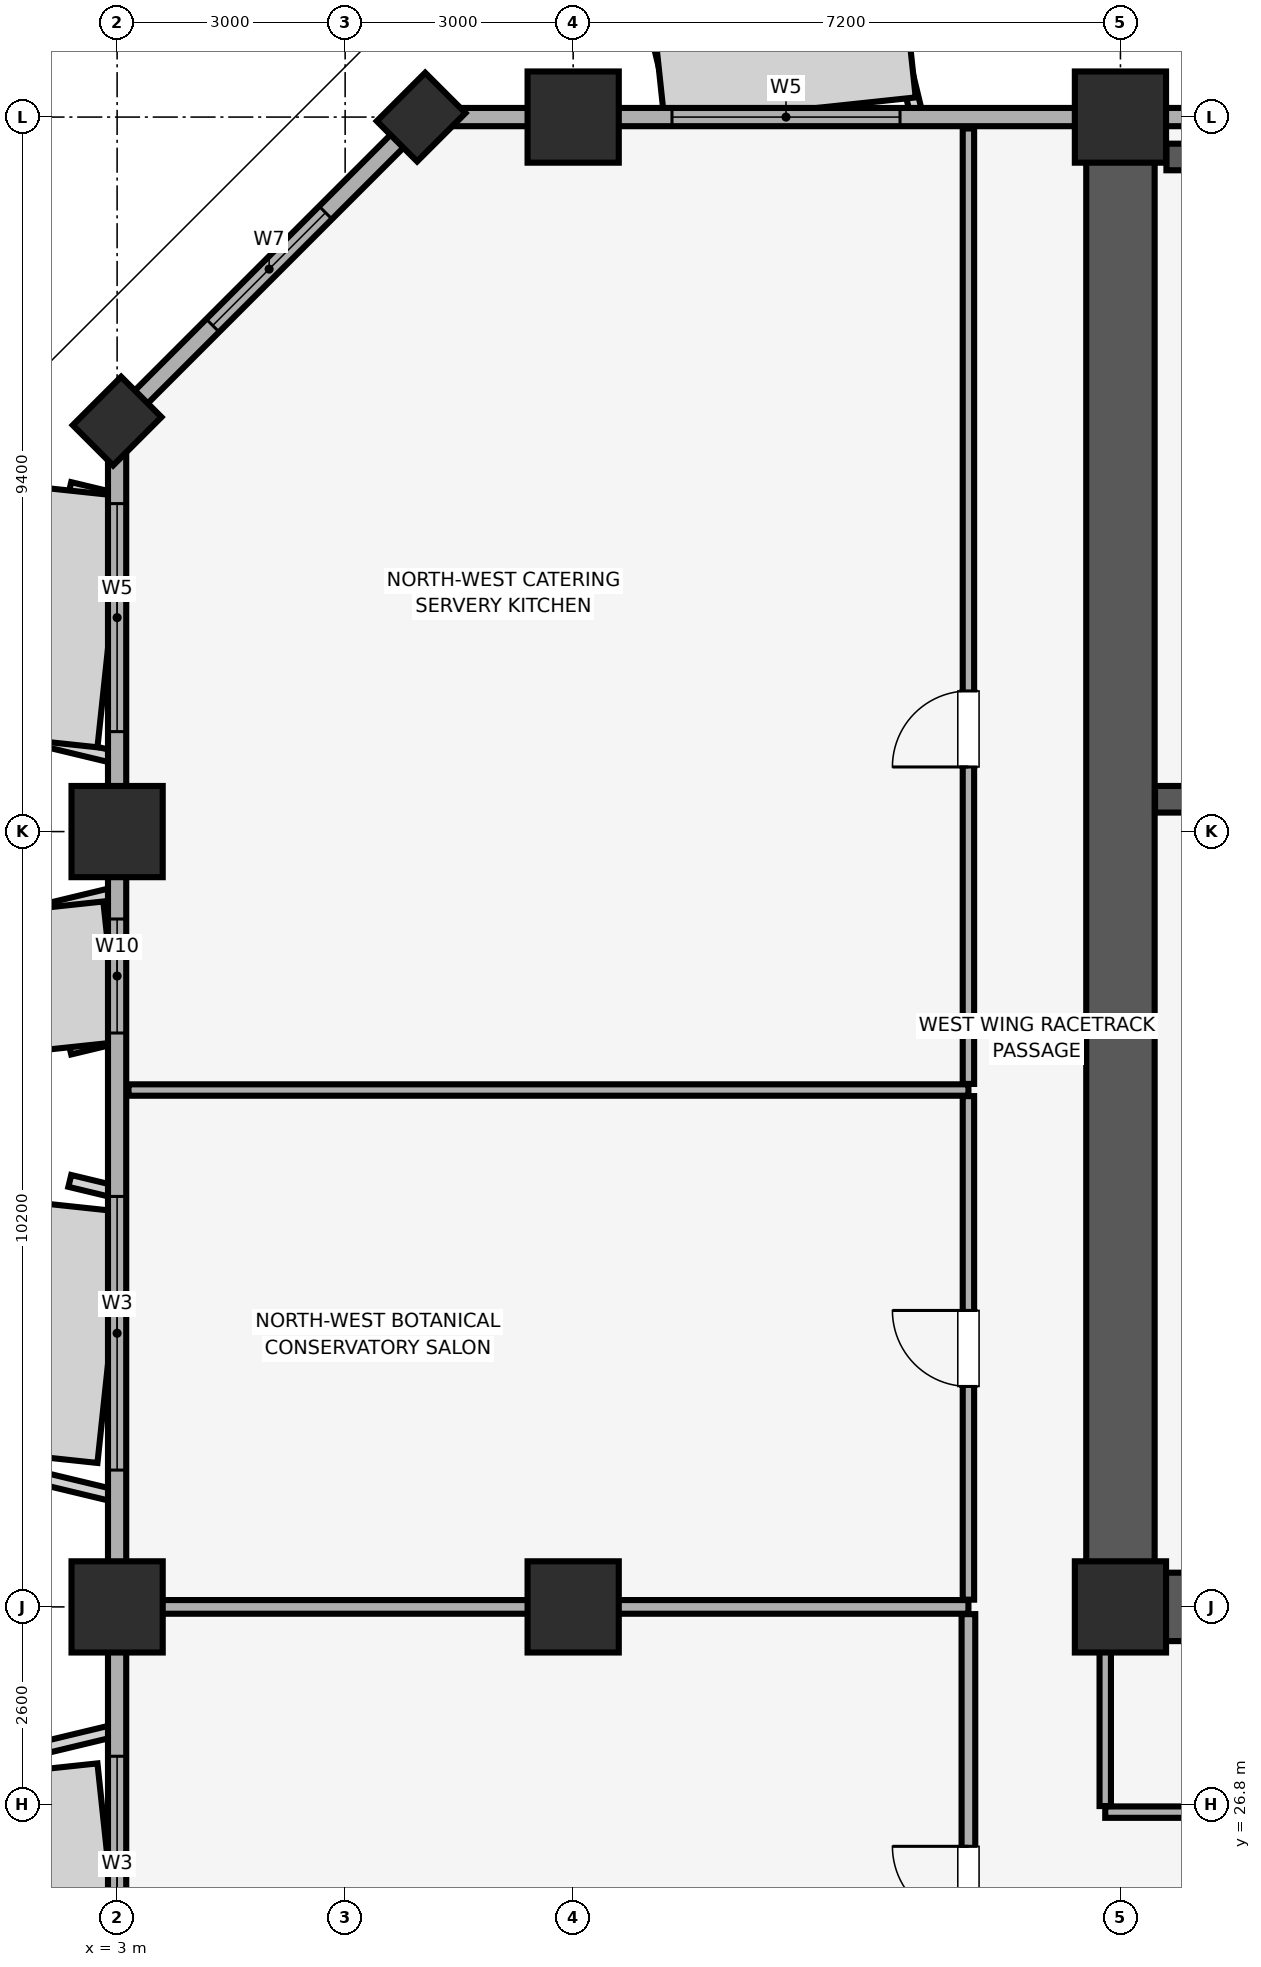
"""IFC4 building model, lengths in metres.
Left out: names, types, materials, properties, quantities, classifications, styles, units other than length and angle.
Written with IfcOpenShell. Run it as: python <this file> out.ifc"""

import sys

from ifc_helpers import new_model, si_unit, direction, frame, frame_2d, origin, origin_2d, place, context, subcontext, project, spatial, rectangle, extrude, element, fill, save


model = new_model("IFC4")
c1 = context("Model", 3, precision=1e-05, world=origin(), true_north=direction((0.0, 1.0)))
c2 = subcontext(c1, "Body", "Model", "MODEL_VIEW")
j1 = project(units=[si_unit("LENGTHUNIT", "METRE"), si_unit("PLANEANGLEUNIT", "RADIAN")], contexts=[c1])
p1 = place(None, origin())
s1 = spatial("IfcSite", under=j1, at=p1, CompositionType="ELEMENT")
p2 = place(p1, origin())
s2 = spatial("IfcBuilding", under=s1, at=p2, CompositionType="ELEMENT")
p3 = place(p2, frame((0.0, 0.0, 220.55)))
s3 = spatial("IfcBuildingStorey", under=s2, at=p3, CompositionType="ELEMENT", Elevation=220.55)
for number, where, z_axis, x_axis in (
    (1, (3.0, 29.4, 0.0), (0.0, 0.0, 1.0), (1.0, 0.0, 0.0)),
    (2, (3.0, 39.6, 0.0), (0.0, 0.0, 1.0), (1.0, 0.0, 0.0)),
):
    element("IfcColumn", number, at=place(p3, frame(where, z_axis=z_axis, x_axis=x_axis)), inside=s3, PredefinedType="COLUMN", context=c2, shape_type="SweptSolid", body=[
        extrude(rectangle(XDim=1.2, YDim=1.2, at=origin_2d()), origin(), (0.0, 0.0, 1.0), 3.56),
    ])
for number, where, z_axis, x_axis in (
    (3, (7.0, 49.0, 0.0), (0.0, 0.0, 1.0), (0.707, 0.707, 0.0)),
    (4, (3.0, 45.0, 0.0), (0.0, 0.0, 1.0), (0.707, 0.707, 0.0)),
):
    element("IfcColumn", number, at=place(p3, frame(where, z_axis=z_axis, x_axis=x_axis)), inside=s3, PredefinedType="PILASTER", context=c2, shape_type="SweptSolid", body=[
        extrude(rectangle(XDim=0.9, YDim=0.75, at=origin_2d()), origin(), (0.0, 0.0, 1.0), 3.56),
    ])
for number, where, z_axis, x_axis in (
    (5, (9.0, 29.4, 0.0), (0.0, 0.0, 1.0), (1.0, 0.0, 0.0)),
    (6, (9.0, 49.0, 0.0), (0.0, 0.0, 1.0), (1.0, 0.0, 0.0)),
    (7, (16.2, 29.4, 0.0), (0.0, 0.0, 1.0), (1.0, 0.0, 0.0)),
    (8, (16.2, 49.0, 0.0), (0.0, 0.0, 1.0), (1.0, 0.0, 0.0)),
):
    element("IfcColumn", number, at=place(p3, frame(where, z_axis=z_axis, x_axis=x_axis)), inside=s3, PredefinedType="COLUMN", context=c2, shape_type="SweptSolid", body=[
        extrude(rectangle(XDim=1.2, YDim=1.2, at=origin_2d()), origin(), (0.0, 0.0, 1.0), 3.56),
    ])
p4 = place(p3, frame((77.0, 49.0, 0.0), z_axis=(0.0, 0.0, 1.0), x_axis=(-1.0, 0.0, 0.0)))
e9 = element("IfcWall", 9, at=p4, inside=s3, PredefinedType="SOLIDWALL", context=c2, shape_type="SweptSolid", body=[
    extrude(rectangle(XDim=70.0, YDim=0.24, at=frame_2d((35.0, 0.0))), origin(), (0.0, 0.0, 1.0), 2.76),
])
p5 = place(p4, frame((63.7, 0.0, 0.85)))
e10 = element("IfcOpeningElement", 10, at=p5, cuts=e9, PredefinedType="OPENING", context=c2, shape_type="SweptSolid", body=[
    extrude(rectangle(XDim=3.0, YDim=1.5, at=frame_2d((1.5, 0.75))), frame((0.0, 0.13, 0.0), z_axis=(0.0, -1.0, 0.0), x_axis=(1.0, 0.0, 0.0)), (0.0, 0.0, 1.0), 0.26),
])
p6 = place(p4, frame((3.3, 0.0, 0.85)))
e11 = element("IfcOpeningElement", 11, at=p6, cuts=e9, PredefinedType="OPENING", context=c2, shape_type="SweptSolid", body=[
    extrude(rectangle(XDim=3.0, YDim=1.5, at=frame_2d((1.5, 0.75))), frame((0.0, 0.13, 0.0), z_axis=(0.0, -1.0, 0.0), x_axis=(1.0, 0.0, 0.0)), (0.0, 0.0, 1.0), 0.26),
])
p7 = place(p4, frame((49.465, 0.0, 0.9)))
e12 = element("IfcOpeningElement", 12, at=p7, cuts=e9, PredefinedType="OPENING", context=c2, shape_type="SweptSolid", body=[
    extrude(rectangle(XDim=1.5, YDim=1.4, at=frame_2d((0.75, 0.7))), frame((0.0, 0.13, 0.0), z_axis=(0.0, -1.0, 0.0), x_axis=(1.0, 0.0, 0.0)), (0.0, 0.0, 1.0), 0.26),
])
p8 = place(p4, frame((41.65, 0.0, 0.9)))
e13 = element("IfcOpeningElement", 13, at=p8, cuts=e9, PredefinedType="OPENING", context=c2, shape_type="SweptSolid", body=[
    extrude(rectangle(XDim=3.6, YDim=1.5, at=frame_2d((1.8, 0.75))), frame((0.0, 0.13, 0.0), z_axis=(0.0, -1.0, 0.0), x_axis=(1.0, 0.0, 0.0)), (0.0, 0.0, 1.0), 0.26),
])
p9 = place(p4, frame((28.25, 0.0, 0.9)))
e14 = element("IfcOpeningElement", 14, at=p9, cuts=e9, PredefinedType="OPENING", context=c2, shape_type="SweptSolid", body=[
    extrude(rectangle(XDim=1.5, YDim=1.4, at=frame_2d((0.75, 0.7))), frame((0.0, 0.13, 0.0), z_axis=(0.0, -1.0, 0.0), x_axis=(1.0, 0.0, 0.0)), (0.0, 0.0, 1.0), 0.26),
])
p10 = place(p4, frame((24.6, 0.0, 0.9)))
e15 = element("IfcOpeningElement", 15, at=p10, cuts=e9, PredefinedType="OPENING", context=c2, shape_type="SweptSolid", body=[
    extrude(rectangle(XDim=2.4, YDim=1.5, at=frame_2d((1.2, 0.75))), frame((0.0, 0.13, 0.0), z_axis=(0.0, -1.0, 0.0), x_axis=(1.0, 0.0, 0.0)), (0.0, 0.0, 1.0), 0.26),
])
p11 = place(p4, frame((20.235, 0.0, 0.9)))
e16 = element("IfcOpeningElement", 16, at=p11, cuts=e9, PredefinedType="OPENING", context=c2, shape_type="SweptSolid", body=[
    extrude(rectangle(XDim=2.4, YDim=1.5, at=frame_2d((1.2, 0.75))), frame((0.0, 0.13, 0.0), z_axis=(0.0, -1.0, 0.0), x_axis=(1.0, 0.0, 0.0)), (0.0, 0.0, 1.0), 0.26),
])
p12 = place(p3, frame((7.0, 49.0, 0.0), z_axis=(0.0, 0.0, 1.0), x_axis=(-0.707106781187, -0.707106781187, 0.0)))
e17 = element("IfcWall", 17, at=p12, inside=s3, PredefinedType="SOLIDWALL", context=c2, shape_type="SweptSolid", body=[
    extrude(rectangle(XDim=5.657, YDim=0.24, at=frame_2d((2.828, 0.0))), origin(), (0.0, 0.0, 1.0), 2.76),
])
p13 = place(p12, frame((1.778, 0.0, 0.85)))
e18 = element("IfcOpeningElement", 18, at=p13, cuts=e17, PredefinedType="OPENING", context=c2, shape_type="SweptSolid", body=[
    extrude(rectangle(XDim=2.1, YDim=1.6, at=frame_2d((1.05, 0.8))), frame((0.0, 0.13, 0.0), z_axis=(0.0, -1.0, 0.0), x_axis=(1.0, 0.0, 0.0)), (0.0, 0.0, 1.0), 0.26),
])
p14 = place(p3, frame((3.0, 45.0, 0.0), z_axis=(0.0, 0.0, 1.0), x_axis=(0.0, -1.0, 0.0)))
e19 = element("IfcWall", 19, at=p14, inside=s3, PredefinedType="SOLIDWALL", context=c2, shape_type="SweptSolid", body=[
    extrude(rectangle(XDim=38.0, YDim=0.24, at=frame_2d((19.0, 0.0))), origin(), (0.0, 0.0, 1.0), 2.76),
])
p15 = place(p14, frame((32.2, 0.0, 0.85)))
e20 = element("IfcOpeningElement", 20, at=p15, cuts=e19, PredefinedType="OPENING", context=c2, shape_type="SweptSolid", body=[
    extrude(rectangle(XDim=3.6, YDim=1.65, at=frame_2d((1.8, 0.825))), frame((0.0, 0.13, 0.0), z_axis=(0.0, -1.0, 0.0), x_axis=(1.0, 0.0, 0.0)), (0.0, 0.0, 1.0), 0.26),
])
p16 = place(p14, frame((24.435, 0.0, 0.85)))
e21 = element("IfcOpeningElement", 21, at=p16, cuts=e19, PredefinedType="OPENING", context=c2, shape_type="SweptSolid", body=[
    extrude(rectangle(XDim=3.6, YDim=1.65, at=frame_2d((1.8, 0.825))), frame((0.0, 0.13, 0.0), z_axis=(0.0, -1.0, 0.0), x_axis=(1.0, 0.0, 0.0)), (0.0, 0.0, 1.0), 0.26),
])
p17 = place(p14, frame((17.565, 0.0, 0.85)))
e22 = element("IfcOpeningElement", 22, at=p17, cuts=e19, PredefinedType="OPENING", context=c2, shape_type="SweptSolid", body=[
    extrude(rectangle(XDim=3.6, YDim=1.65, at=frame_2d((1.8, 0.825))), frame((0.0, 0.13, 0.0), z_axis=(0.0, -1.0, 0.0), x_axis=(1.0, 0.0, 0.0)), (0.0, 0.0, 1.0), 0.26),
])
p18 = place(p14, frame((10.2, 0.0, 0.85)))
e23 = element("IfcOpeningElement", 23, at=p18, cuts=e19, PredefinedType="OPENING", context=c2, shape_type="SweptSolid", body=[
    extrude(rectangle(XDim=3.6, YDim=1.65, at=frame_2d((1.8, 0.825))), frame((0.0, 0.13, 0.0), z_axis=(0.0, -1.0, 0.0), x_axis=(1.0, 0.0, 0.0)), (0.0, 0.0, 1.0), 0.26),
])
p19 = place(p14, frame((6.55, 0.0, 0.85)))
e24 = element("IfcOpeningElement", 24, at=p19, cuts=e19, PredefinedType="OPENING", context=c2, shape_type="SweptSolid", body=[
    extrude(rectangle(XDim=1.5, YDim=1.4, at=frame_2d((0.75, 0.7))), frame((0.0, 0.13, 0.0), z_axis=(0.0, -1.0, 0.0), x_axis=(1.0, 0.0, 0.0)), (0.0, 0.0, 1.0), 0.26),
])
p20 = place(p14, frame((1.085, 0.0, 0.85)))
e25 = element("IfcOpeningElement", 25, at=p20, cuts=e19, PredefinedType="OPENING", context=c2, shape_type="SweptSolid", body=[
    extrude(rectangle(XDim=3.0, YDim=1.5, at=frame_2d((1.5, 0.75))), frame((0.0, 0.13, 0.0), z_axis=(0.0, -1.0, 0.0), x_axis=(1.0, 0.0, 0.0)), (0.0, 0.0, 1.0), 0.26),
])
p21 = place(p3, frame((16.2, 29.4, 0.0), z_axis=(0.0, 0.0, 1.0), x_axis=(0.0, 1.0, 0.0)))
e26 = element("IfcWall", 26, at=p21, inside=s3, PredefinedType="SHEAR", context=c2, shape_type="SweptSolid", body=[
    extrude(rectangle(XDim=19.2, YDim=0.9, at=frame_2d((9.6, 0.0))), origin(), (0.0, 0.0, 1.0), 3.56),
])
p22 = place(p3, frame((16.655, 29.4, 0.0), z_axis=(0.0, 0.0, 1.0), x_axis=(1.0, 0.0, 0.0)))
e27 = element("IfcWall", 27, at=p22, inside=s3, PredefinedType="SHEAR", context=c2, shape_type="SweptSolid", body=[
    extrude(rectangle(XDim=6.945, YDim=0.9, at=frame_2d((3.473, 0.0))), origin(), (0.0, 0.0, 1.0), 3.56),
])
p23 = place(p3, frame((16.655, 40.025, 0.0), z_axis=(0.0, 0.0, 1.0), x_axis=(1.0, 0.0, 0.0)))
e28 = element("IfcWall", 28, at=p23, inside=s3, PredefinedType="SHEAR", context=c2, shape_type="SweptSolid", body=[
    extrude(rectangle(XDim=4.2, YDim=0.35, at=frame_2d((2.1, 0.0))), origin(), (0.0, 0.0, 1.0), 3.56),
])
p24 = place(p23, frame((1.81, 0.0, 0.0)))
e29 = element("IfcOpeningElement", 29, at=p24, cuts=e28, PredefinedType="OPENING", context=c2, shape_type="SweptSolid", body=[
    extrude(rectangle(XDim=1.15, YDim=2.15, at=frame_2d((0.575, 1.075))), frame((0.0, 0.185, 0.0), z_axis=(0.0, -1.0, 0.0), x_axis=(1.0, 0.0, 0.0)), (0.0, 0.0, 1.0), 0.37),
])
p25 = place(p3, frame((16.805, 48.475, 0.0), z_axis=(0.0, 0.0, 1.0), x_axis=(1.0, 0.0, 0.0)))
e30 = element("IfcWall", 30, at=p25, inside=s3, PredefinedType="SHEAR", context=c2, shape_type="SweptSolid", body=[
    extrude(rectangle(XDim=4.05, YDim=0.35, at=frame_2d((2.025, 0.0))), origin(), (0.0, 0.0, 1.0), 3.56),
])
p26 = place(p3, frame((3.15, 29.4, 0.0), z_axis=(0.0, 0.0, 1.0), x_axis=(1.0, 0.0, 0.0)))
e31 = element("IfcWall", 31, at=p26, inside=s3, PredefinedType="PARTITIONING", context=c2, shape_type="SweptSolid", body=[
    extrude(rectangle(XDim=11.05, YDim=0.18, at=frame_2d((5.525, 0.0))), origin(), (0.0, 0.0, 1.0), 2.719),
])
p27 = place(p3, frame((14.2, 24.895, 0.0), z_axis=(0.0, 0.0, 1.0), x_axis=(0.0, 1.0, 0.0)))
e32 = element("IfcWall", 32, at=p27, inside=s3, PredefinedType="PARTITIONING", context=c2, shape_type="SweptSolid", body=[
    extrude(rectangle(XDim=4.41, YDim=0.18, at=frame_2d((2.205, 0.0))), origin(), (0.0, 0.0, 1.0), 3.56),
])
p28 = place(p27, frame((0.355, 0.0, 0.0)))
e33 = element("IfcOpeningElement", 33, at=p28, cuts=e32, PredefinedType="OPENING", context=c2, shape_type="SweptSolid", body=[
    extrude(rectangle(XDim=1.0, YDim=2.15, at=frame_2d((0.5, 1.075))), frame((0.0, 0.1, 0.0), z_axis=(0.0, -1.0, 0.0), x_axis=(1.0, 0.0, 0.0)), (0.0, 0.0, 1.0), 0.2),
])
p29 = place(p3, frame((16.0, 26.7, 0.0), z_axis=(0.0, 0.0, 1.0), x_axis=(1.0, 0.0, 0.0)))
e34 = element("IfcWall", 34, at=p29, inside=s3, PredefinedType="PARTITIONING", context=c2, shape_type="SweptSolid", body=[
    extrude(rectangle(XDim=18.6, YDim=0.15, at=frame_2d((9.3, 0.0))), origin(), (0.0, 0.0, 1.0), 3.56),
])
p30 = place(p29, frame((8.8, 0.0, 0.0)))
e35 = element("IfcOpeningElement", 35, at=p30, cuts=e34, PredefinedType="OPENING", context=c2, shape_type="SweptSolid", body=[
    extrude(rectangle(XDim=1.0, YDim=2.15, at=frame_2d((0.5, 1.075))), frame((0.0, 0.085, 0.0), z_axis=(0.0, -1.0, 0.0), x_axis=(1.0, 0.0, 0.0)), (0.0, 0.0, 1.0), 0.17),
])
p31 = place(p3, frame((16.0, 26.78, 0.0), z_axis=(0.0, 0.0, 1.0), x_axis=(0.0, 1.0, 0.0)))
e36 = element("IfcWall", 36, at=p31, inside=s3, PredefinedType="PARTITIONING", context=c2, shape_type="SweptSolid", body=[
    extrude(rectangle(XDim=2.61, YDim=0.15, at=frame_2d((1.305, 0.0))), origin(), (0.0, 0.0, 1.0), 3.06),
])
p32 = place(p3, frame((3.15, 36.2, 0.0), z_axis=(0.0, 0.0, 1.0), x_axis=(1.0, 0.0, 0.0)))
e37 = element("IfcWall", 37, at=p32, inside=s3, PredefinedType="PARTITIONING", context=c2, shape_type="SweptSolid", body=[
    extrude(rectangle(XDim=11.05, YDim=0.15, at=frame_2d((5.525, 0.0))), origin(), (0.0, 0.0, 1.0), 3.56),
])
p33 = place(p3, frame((14.2, 29.495, 0.0), z_axis=(0.0, 0.0, 1.0), x_axis=(0.0, 1.0, 0.0)))
e38 = element("IfcWall", 38, at=p33, inside=s3, PredefinedType="PARTITIONING", context=c2, shape_type="SweptSolid", body=[
    extrude(rectangle(XDim=6.625, YDim=0.15, at=frame_2d((3.312, 0.0))), origin(), (0.0, 0.0, 1.0), 3.56),
])
p34 = place(p33, frame((2.805, 0.0, 0.0)))
e39 = element("IfcOpeningElement", 39, at=p34, cuts=e38, PredefinedType="OPENING", context=c2, shape_type="SweptSolid", body=[
    extrude(rectangle(XDim=1.0, YDim=2.15, at=frame_2d((0.5, 1.075))), frame((0.0, 0.085, 0.0), z_axis=(0.0, -1.0, 0.0), x_axis=(1.0, 0.0, 0.0)), (0.0, 0.0, 1.0), 0.17),
])
p35 = place(p3, frame((14.2, 36.28, 0.0), z_axis=(0.0, 0.0, 1.0), x_axis=(0.0, 1.0, 0.0)))
e40 = element("IfcWall", 40, at=p35, inside=s3, PredefinedType="PARTITIONING", context=c2, shape_type="SweptSolid", body=[
    extrude(rectangle(XDim=12.57, YDim=0.15, at=frame_2d((6.285, 0.0))), origin(), (0.0, 0.0, 1.0), 3.56),
])
p36 = place(p35, frame((4.17, 0.0, 0.0)))
e41 = element("IfcOpeningElement", 41, at=p36, cuts=e40, PredefinedType="OPENING", context=c2, shape_type="SweptSolid", body=[
    extrude(rectangle(XDim=1.0, YDim=2.15, at=frame_2d((0.5, 1.075))), frame((0.0, 0.085, 0.0), z_axis=(0.0, -1.0, 0.0), x_axis=(1.0, 0.0, 0.0)), (0.0, 0.0, 1.0), 0.17),
])
p37 = place(p13, origin())
e42 = element("IfcWindow", 42, at=p37, inside=s3, PartitioningType="SINGLE_PANEL", PredefinedType="WINDOW", context=c2, shape_type="SweptSolid", body=[
    extrude(rectangle(XDim=2.1, YDim=1.6, at=frame_2d((1.05, 0.8))), frame((0.0, 0.03, 0.0), z_axis=(0.0, -1.0, 0.0), x_axis=(1.0, 0.0, 0.0)), (0.0, 0.0, 1.0), 0.06),
])
fill(e18, e42)
p38 = place(p17, origin())
e43 = element("IfcWindow", 43, at=p38, inside=s3, PartitioningType="SINGLE_PANEL", PredefinedType="WINDOW", context=c2, shape_type="SweptSolid", body=[
    extrude(rectangle(XDim=3.6, YDim=1.65, at=frame_2d((1.8, 0.825))), frame((0.0, 0.03, 0.0), z_axis=(0.0, -1.0, 0.0), x_axis=(1.0, 0.0, 0.0)), (0.0, 0.0, 1.0), 0.06),
])
fill(e22, e43)
p39 = place(p18, origin())
e44 = element("IfcWindow", 44, at=p39, inside=s3, PartitioningType="SINGLE_PANEL", PredefinedType="WINDOW", context=c2, shape_type="SweptSolid", body=[
    extrude(rectangle(XDim=3.6, YDim=1.65, at=frame_2d((1.8, 0.825))), frame((0.0, 0.03, 0.0), z_axis=(0.0, -1.0, 0.0), x_axis=(1.0, 0.0, 0.0)), (0.0, 0.0, 1.0), 0.06),
])
fill(e23, e44)
p40 = place(p19, origin())
e45 = element("IfcWindow", 45, at=p40, inside=s3, PartitioningType="SINGLE_PANEL", PredefinedType="WINDOW", context=c2, shape_type="SweptSolid", body=[
    extrude(rectangle(XDim=1.5, YDim=1.4, at=frame_2d((0.75, 0.7))), frame((0.0, 0.03, 0.0), z_axis=(0.0, -1.0, 0.0), x_axis=(1.0, 0.0, 0.0)), (0.0, 0.0, 1.0), 0.06),
])
fill(e24, e45)
p41 = place(p20, origin())
e46 = element("IfcWindow", 46, at=p41, inside=s3, PartitioningType="SINGLE_PANEL", PredefinedType="WINDOW", context=c2, shape_type="SweptSolid", body=[
    extrude(rectangle(XDim=3.0, YDim=1.5, at=frame_2d((1.5, 0.75))), frame((0.0, 0.03, 0.0), z_axis=(0.0, -1.0, 0.0), x_axis=(1.0, 0.0, 0.0)), (0.0, 0.0, 1.0), 0.06),
])
fill(e25, e46)
p42 = place(p5, origin())
e47 = element("IfcWindow", 47, at=p42, inside=s3, PartitioningType="SINGLE_PANEL", PredefinedType="WINDOW", context=c2, shape_type="SweptSolid", body=[
    extrude(rectangle(XDim=3.0, YDim=1.5, at=frame_2d((1.5, 0.75))), frame((0.0, 0.03, 0.0), z_axis=(0.0, -1.0, 0.0), x_axis=(1.0, 0.0, 0.0)), (0.0, 0.0, 1.0), 0.06),
])
fill(e10, e47)
p43 = place(p28, origin())
e48 = element("IfcDoor", 48, at=p43, inside=s3, OperationType="SINGLE_SWING_RIGHT", PredefinedType="DOOR", context=c2, shape_type="SweptSolid", body=[
    extrude(rectangle(XDim=1.0, YDim=2.15, at=frame_2d((0.5, 1.075))), frame((0.0, 0.025, 0.0), z_axis=(0.0, -1.0, 0.0), x_axis=(1.0, 0.0, 0.0)), (0.0, 0.0, 1.0), 0.05),
])
fill(e33, e48)
p44 = place(p34, origin())
e49 = element("IfcDoor", 49, at=p44, inside=s3, OperationType="SINGLE_SWING_RIGHT", PredefinedType="DOOR", context=c2, shape_type="SweptSolid", body=[
    extrude(rectangle(XDim=1.0, YDim=2.15, at=frame_2d((0.5, 1.075))), frame((0.0, 0.025, 0.0), z_axis=(0.0, -1.0, 0.0), x_axis=(1.0, 0.0, 0.0)), (0.0, 0.0, 1.0), 0.05),
])
fill(e39, e49)
p45 = place(p36, origin())
e50 = element("IfcDoor", 50, at=p45, inside=s3, OperationType="SINGLE_SWING_LEFT", PredefinedType="DOOR", context=c2, shape_type="SweptSolid", body=[
    extrude(rectangle(XDim=1.0, YDim=2.15, at=frame_2d((0.5, 1.075))), frame((0.0, 0.025, 0.0), z_axis=(0.0, -1.0, 0.0), x_axis=(1.0, 0.0, 0.0)), (0.0, 0.0, 1.0), 0.05),
])
fill(e41, e50)
save(model, sys.argv[1])
